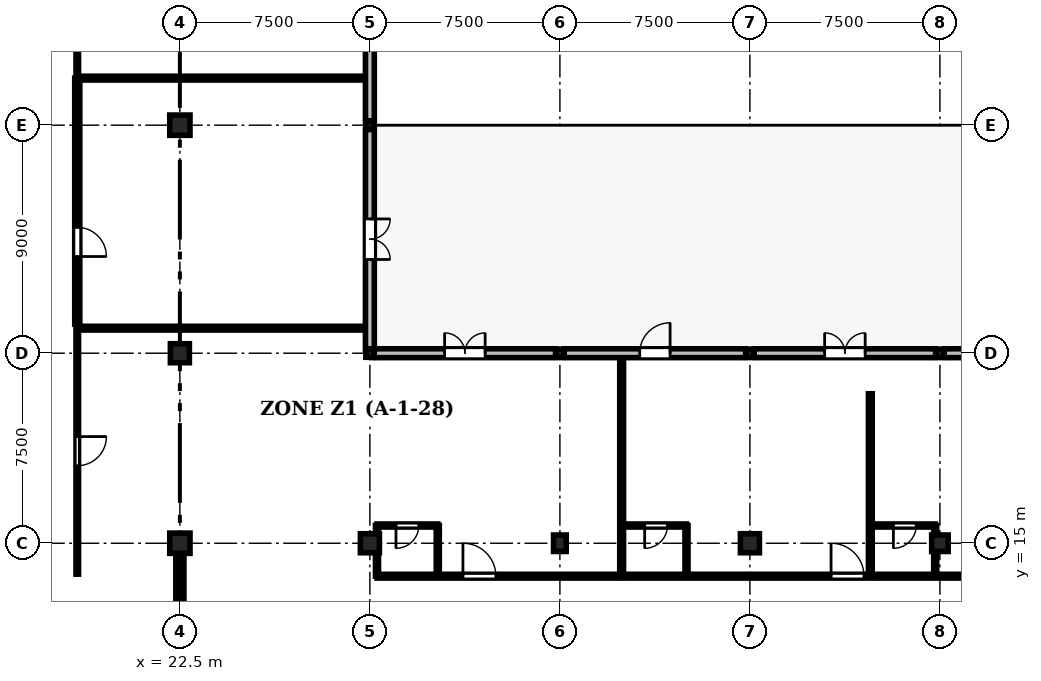
"""IFC4 building model, lengths in metres.
Left out: names, types, materials, properties, quantities, classifications, styles, units other than length and angle.
Written with IfcOpenShell. Run it as: python <this file> out.ifc"""

import sys

from ifc_helpers import new_model, si_unit, direction, frame, frame_2d, origin, origin_2d, place, context, subcontext, project, spatial, rectangle, circle, extrude, element, fill, save


model = new_model("IFC4")
c1 = context("Model", 3, precision=1e-05, world=origin(), true_north=direction((0.0, 1.0)))
c2 = subcontext(c1, "Body", "Model", "MODEL_VIEW")
j1 = project(units=[si_unit("LENGTHUNIT", "METRE"), si_unit("PLANEANGLEUNIT", "RADIAN")], contexts=[c1])
p1 = place(None, origin())
s1 = spatial("IfcSite", under=j1, at=p1, CompositionType="ELEMENT")
p2 = place(p1, origin())
s2 = spatial("IfcBuilding", under=s1, at=p2, CompositionType="ELEMENT")
p3 = place(p2, frame((0.0, 0.0, 9.3)))
s3 = spatial("IfcBuildingStorey", under=s2, at=p3, CompositionType="ELEMENT", Elevation=9.3)
p4 = place(p3, frame((22.5, 15.0, 0.0), z_axis=(0.0, 0.0, 1.0), x_axis=(1.0, 0.0, 0.0)))
e1 = element("IfcColumn", 1, at=p4, inside=s3, PredefinedType="COLUMN", context=c2, shape_type="SweptSolid", body=[
    extrude(rectangle(XDim=0.8, YDim=0.8, at=origin_2d()), origin(), (0.0, 0.0, 1.0), 4.8),
])
p5 = place(p3, frame((22.5, 22.5, 0.0), z_axis=(0.0, 0.0, 1.0), x_axis=(1.0, 0.0, 0.0)))
e2 = element("IfcColumn", 2, at=p5, inside=s3, PredefinedType="COLUMN", context=c2, shape_type="SweptSolid", body=[
    extrude(circle(Radius=0.375, at=origin_2d()), origin(), (0.0, 0.0, 1.0), 4.8),
])
p6 = place(p3, frame((22.5, 31.5, 0.0), z_axis=(0.0, 0.0, 1.0), x_axis=(1.0, 0.0, 0.0)))
e3 = element("IfcColumn", 3, at=p6, inside=s3, PredefinedType="COLUMN", context=c2, shape_type="SweptSolid", body=[
    extrude(rectangle(XDim=0.8, YDim=0.8, at=origin_2d()), origin(), (0.0, 0.0, 1.0), 4.8),
])
p7 = place(p3, frame((30.0, 15.0, 0.0), z_axis=(0.0, 0.0, 1.0), x_axis=(1.0, 0.0, 0.0)))
e4 = element("IfcColumn", 4, at=p7, inside=s3, PredefinedType="COLUMN", context=c2, shape_type="SweptSolid", body=[
    extrude(circle(Radius=0.375, at=origin_2d()), origin(), (0.0, 0.0, 1.0), 4.8),
])
for number, where, z_axis, x_axis in (
    (5, (30.0, 22.5, 0.0), (0.0, 0.0, 1.0), (1.0, 0.0, 0.0)),
    (6, (30.0, 31.5, 0.0), (0.0, 0.0, 1.0), (1.0, 0.0, 0.0)),
):
    element("IfcColumn", number, at=place(p3, frame(where, z_axis=z_axis, x_axis=x_axis)), inside=s3, PredefinedType="COLUMN", context=c2, shape_type="SweptSolid", body=[
        extrude(rectangle(XDim=0.32, YDim=0.32, at=origin_2d()), origin(), (0.0, 0.0, 1.0), 4.8),
    ])
p8 = place(p3, frame((37.5, 15.0, 0.0), z_axis=(0.0, 0.0, 1.0), x_axis=(1.0, 0.0, 0.0)))
e7 = element("IfcColumn", 7, at=p8, inside=s3, PredefinedType="COLUMN", context=c2, shape_type="SweptSolid", body=[
    extrude(rectangle(XDim=0.5, YDim=0.65, at=origin_2d()), origin(), (0.0, 0.0, 1.0), 4.8),
])
p9 = place(p3, frame((37.5, 22.5, 0.0), z_axis=(0.0, 0.0, 1.0), x_axis=(1.0, 0.0, 0.0)))
e8 = element("IfcColumn", 8, at=p9, inside=s3, PredefinedType="COLUMN", context=c2, shape_type="SweptSolid", body=[
    extrude(rectangle(XDim=0.32, YDim=0.32, at=origin_2d()), origin(), (0.0, 0.0, 1.0), 4.8),
])
p10 = place(p3, frame((45.0, 15.0, 0.0), z_axis=(0.0, 0.0, 1.0), x_axis=(1.0, 0.0, 0.0)))
e9 = element("IfcColumn", 9, at=p10, inside=s3, PredefinedType="COLUMN", context=c2, shape_type="SweptSolid", body=[
    extrude(rectangle(XDim=0.75, YDim=0.75, at=origin_2d()), origin(), (0.0, 0.0, 1.0), 4.8),
])
p11 = place(p3, frame((45.0, 22.5, 0.0), z_axis=(0.0, 0.0, 1.0), x_axis=(1.0, 0.0, 0.0)))
e10 = element("IfcColumn", 10, at=p11, inside=s3, PredefinedType="COLUMN", context=c2, shape_type="SweptSolid", body=[
    extrude(rectangle(XDim=0.32, YDim=0.32, at=origin_2d()), origin(), (0.0, 0.0, 1.0), 4.8),
])
p12 = place(p3, frame((52.5, 15.0, 0.0), z_axis=(0.0, 0.0, 1.0), x_axis=(1.0, 0.0, 0.0)))
e11 = element("IfcColumn", 11, at=p12, inside=s3, PredefinedType="COLUMN", context=c2, shape_type="SweptSolid", body=[
    extrude(rectangle(XDim=0.65, YDim=0.65, at=origin_2d()), origin(), (0.0, 0.0, 1.0), 4.8),
])
p13 = place(p3, frame((52.5, 22.5, 0.0), z_axis=(0.0, 0.0, 1.0), x_axis=(1.0, 0.0, 0.0)))
e12 = element("IfcColumn", 12, at=p13, inside=s3, PredefinedType="COLUMN", context=c2, shape_type="SweptSolid", body=[
    extrude(rectangle(XDim=0.32, YDim=0.32, at=origin_2d()), origin(), (0.0, 0.0, 1.0), 4.8),
])
p14 = place(p3, frame((22.5, 7.95, 0.0), z_axis=(0.0, 0.0, 1.0), x_axis=(0.0, 1.0, 0.0)))
e13 = element("IfcWall", 13, at=p14, inside=s3, PredefinedType="SHEAR", context=c2, shape_type="SweptSolid", body=[
    extrude(rectangle(XDim=6.6, YDim=0.32, at=frame_2d((3.3, 0.0))), origin(), (0.0, 0.0, 1.0), 4.0),
])
p15 = place(p3, frame((30.0, 31.33, 0.0), z_axis=(0.0, 0.0, 1.0), x_axis=(0.0, -1.0, 0.0)))
e14 = element("IfcWall", 14, at=p15, inside=s3, PredefinedType="STANDARD", context=c2, shape_type="SweptSolid", body=[
    extrude(rectangle(XDim=8.66, YDim=0.35, at=frame_2d((4.33, 0.0))), origin(), (0.0, 0.0, 1.0), 4.0),
])
p16 = place(p15, frame((3.53, 0.0, 0.0)))
e15 = element("IfcOpeningElement", 15, at=p16, cuts=e14, PredefinedType="OPENING", context=c2, shape_type="SweptSolid", body=[
    extrude(rectangle(XDim=1.6, YDim=2.35, at=frame_2d((0.8, 1.175))), frame((0.0, 0.185, 0.0), z_axis=(0.0, -1.0, 0.0), x_axis=(1.0, 0.0, 0.0)), (0.0, 0.0, 1.0), 0.37),
])
p17 = place(p3, frame((30.0, 38.83, 0.0), z_axis=(0.0, 0.0, 1.0), x_axis=(0.0, -1.0, 0.0)))
e16 = element("IfcWall", 16, at=p17, inside=s3, PredefinedType="STANDARD", context=c2, shape_type="SweptSolid", body=[
    extrude(rectangle(XDim=7.16, YDim=0.35, at=frame_2d((3.58, 0.0))), origin(), (0.0, 0.0, 1.0), 3.95),
])
p18 = place(p17, frame((2.78, 0.0, 0.9)))
e17 = element("IfcOpeningElement", 17, at=p18, cuts=e16, PredefinedType="OPENING", context=c2, shape_type="SweptSolid", body=[
    extrude(rectangle(XDim=1.6, YDim=1.8, at=frame_2d((0.8, 0.9))), frame((0.0, 0.185, 0.0), z_axis=(0.0, -1.0, 0.0), x_axis=(1.0, 0.0, 0.0)), (0.0, 0.0, 1.0), 0.37),
])
p19 = place(p3, frame((30.17, 22.5, 0.0), z_axis=(0.0, 0.0, 1.0), x_axis=(1.0, 0.0, 0.0)))
e18 = element("IfcWall", 18, at=p19, inside=s3, PredefinedType="STANDARD", context=c2, shape_type="SweptSolid", body=[
    extrude(rectangle(XDim=7.16, YDim=0.35, at=frame_2d((3.58, 0.0))), origin(), (0.0, 0.0, 1.0), 3.95),
])
p20 = place(p19, frame((2.78, 0.0, 0.0)))
e19 = element("IfcOpeningElement", 19, at=p20, cuts=e18, PredefinedType="OPENING", context=c2, shape_type="SweptSolid", body=[
    extrude(rectangle(XDim=1.6, YDim=2.35, at=frame_2d((0.8, 1.175))), frame((0.0, 0.185, 0.0), z_axis=(0.0, -1.0, 0.0), x_axis=(1.0, 0.0, 0.0)), (0.0, 0.0, 1.0), 0.37),
])
p21 = place(p3, frame((37.67, 22.5, 0.0), z_axis=(0.0, 0.0, 1.0), x_axis=(1.0, 0.0, 0.0)))
e20 = element("IfcWall", 20, at=p21, inside=s3, PredefinedType="STANDARD", context=c2, shape_type="SweptSolid", body=[
    extrude(rectangle(XDim=7.16, YDim=0.35, at=frame_2d((3.58, 0.0))), origin(), (0.0, 0.0, 1.0), 3.95),
])
p22 = place(p21, frame((2.98, 0.0, 0.0)))
e21 = element("IfcOpeningElement", 21, at=p22, cuts=e20, PredefinedType="OPENING", context=c2, shape_type="SweptSolid", body=[
    extrude(rectangle(XDim=1.2, YDim=2.3, at=frame_2d((0.6, 1.15))), frame((0.0, 0.185, 0.0), z_axis=(0.0, -1.0, 0.0), x_axis=(1.0, 0.0, 0.0)), (0.0, 0.0, 1.0), 0.37),
])
p23 = place(p3, frame((45.17, 22.5, 0.0), z_axis=(0.0, 0.0, 1.0), x_axis=(1.0, 0.0, 0.0)))
e22 = element("IfcWall", 22, at=p23, inside=s3, PredefinedType="STANDARD", context=c2, shape_type="SweptSolid", body=[
    extrude(rectangle(XDim=7.16, YDim=0.35, at=frame_2d((3.58, 0.0))), origin(), (0.0, 0.0, 1.0), 3.95),
])
p24 = place(p23, frame((2.78, 0.0, 0.0)))
e23 = element("IfcOpeningElement", 23, at=p24, cuts=e22, PredefinedType="OPENING", context=c2, shape_type="SweptSolid", body=[
    extrude(rectangle(XDim=1.6, YDim=2.35, at=frame_2d((0.8, 1.175))), frame((0.0, 0.185, 0.0), z_axis=(0.0, -1.0, 0.0), x_axis=(1.0, 0.0, 0.0)), (0.0, 0.0, 1.0), 0.37),
])
p25 = place(p3, frame((52.67, 22.5, 0.0), z_axis=(0.0, 0.0, 1.0), x_axis=(1.0, 0.0, 0.0)))
e24 = element("IfcWall", 24, at=p25, inside=s3, PredefinedType="STANDARD", context=c2, shape_type="SweptSolid", body=[
    extrude(rectangle(XDim=7.02, YDim=0.35, at=frame_2d((3.51, 0.0))), origin(), (0.0, 0.0, 1.0), 3.95),
])
p26 = place(p25, frame((2.91, 0.0, 0.0)))
e25 = element("IfcOpeningElement", 25, at=p26, cuts=e24, PredefinedType="OPENING", context=c2, shape_type="SweptSolid", body=[
    extrude(rectangle(XDim=1.2, YDim=2.3, at=frame_2d((0.6, 1.15))), frame((0.0, 0.185, 0.0), z_axis=(0.0, -1.0, 0.0), x_axis=(1.0, 0.0, 0.0)), (0.0, 0.0, 1.0), 0.37),
])
p27 = place(p3, frame((18.45, 23.489, 0.0), z_axis=(0.0, 0.0, 1.0), x_axis=(0.0, -1.0, 0.0)))
e26 = element("IfcWall", 26, at=p27, inside=s3, PredefinedType="PARTITIONING", context=c2, shape_type="SweptSolid", body=[
    extrude(rectangle(XDim=9.709, YDim=0.1, at=frame_2d((4.854, 0.0))), origin(), (0.0, 0.0, 1.0), 4.135),
])
p28 = place(p27, frame((4.279, 0.0, 0.0)))
e27 = element("IfcOpeningElement", 27, at=p28, cuts=e26, PredefinedType="OPENING", context=c2, shape_type="SweptSolid", body=[
    extrude(rectangle(XDim=1.15, YDim=2.2, at=frame_2d((0.575, 1.1))), frame((0.0, 0.06, 0.0), z_axis=(0.0, -1.0, 0.0), x_axis=(1.0, 0.0, 0.0)), (0.0, 0.0, 1.0), 0.12),
])
p29 = place(p3, frame((18.45, 33.357, 0.0), z_axis=(0.0, 0.0, 1.0), x_axis=(0.0, -1.0, 0.0)))
e28 = element("IfcWall", 28, at=p29, inside=s3, PredefinedType="STANDARD", context=c2, shape_type="SweptSolid", body=[
    extrude(rectangle(XDim=9.709, YDim=0.2, at=frame_2d((4.854, 0.0))), origin(), (0.0, 0.0, 1.0), 4.135),
])
p30 = place(p29, frame((5.891, 0.0, 0.0)))
e29 = element("IfcOpeningElement", 29, at=p30, cuts=e28, PredefinedType="OPENING", context=c2, shape_type="SweptSolid", body=[
    extrude(rectangle(XDim=1.15, YDim=2.2, at=frame_2d((0.575, 1.1))), frame((0.0, 0.11, 0.0), z_axis=(0.0, -1.0, 0.0), x_axis=(1.0, 0.0, 0.0)), (0.0, 0.0, 1.0), 0.22),
])
p31 = place(p3, frame((18.45, 43.226, 0.0), z_axis=(0.0, 0.0, 1.0), x_axis=(0.0, -1.0, 0.0)))
e30 = element("IfcWall", 30, at=p31, inside=s3, PredefinedType="PARTITIONING", context=c2, shape_type="SweptSolid", body=[
    extrude(rectangle(XDim=9.709, YDim=0.1, at=frame_2d((4.854, 0.0))), origin(), (0.0, 0.0, 1.0), 4.535),
])
p32 = place(p31, frame((7.593, 0.0, 0.0)))
e31 = element("IfcOpeningElement", 31, at=p32, cuts=e30, PredefinedType="OPENING", context=c2, shape_type="SweptSolid", body=[
    extrude(rectangle(XDim=1.05, YDim=2.2, at=frame_2d((0.525, 1.1))), frame((0.0, 0.06, 0.0), z_axis=(0.0, -1.0, 0.0), x_axis=(1.0, 0.0, 0.0)), (0.0, 0.0, 1.0), 0.12),
])
p33 = place(p3, frame((30.28, 13.7, 0.0), z_axis=(0.0, 0.0, 1.0), x_axis=(1.0, 0.0, 0.0)))
e32 = element("IfcWall", 32, at=p33, inside=s3, PredefinedType="PARTITIONING", context=c2, shape_type="SweptSolid", body=[
    extrude(rectangle(XDim=9.657, YDim=0.15, at=frame_2d((4.828, 0.0))), origin(), (0.0, 0.0, 1.0), 4.535),
])
p34 = place(p33, frame((3.393, 0.0, 0.0)))
e33 = element("IfcOpeningElement", 33, at=p34, cuts=e32, PredefinedType="OPENING", context=c2, shape_type="SweptSolid", body=[
    extrude(rectangle(XDim=1.3, YDim=2.2, at=frame_2d((0.65, 1.1))), frame((0.0, 0.085, 0.0), z_axis=(0.0, -1.0, 0.0), x_axis=(1.0, 0.0, 0.0)), (0.0, 0.0, 1.0), 0.17),
])
p35 = place(p3, frame((32.68, 15.7, 0.0), z_axis=(0.0, 0.0, 1.0), x_axis=(-1.0, 0.0, 0.0)))
e34 = element("IfcWall", 34, at=p35, inside=s3, PredefinedType="PARTITIONING", context=c2, shape_type="SweptSolid", body=[
    extrude(rectangle(XDim=2.4, YDim=0.12, at=frame_2d((1.2, 0.0))), origin(), (0.0, 0.0, 1.0), 4.535),
])
p36 = place(p35, frame((0.75, 0.0, 0.0)))
e35 = element("IfcOpeningElement", 35, at=p36, cuts=e34, PredefinedType="OPENING", context=c2, shape_type="SweptSolid", body=[
    extrude(rectangle(XDim=0.9, YDim=2.1, at=frame_2d((0.45, 1.05))), frame((0.0, 0.07, 0.0), z_axis=(0.0, -1.0, 0.0), x_axis=(1.0, 0.0, 0.0)), (0.0, 0.0, 1.0), 0.14),
])
p37 = place(p3, frame((32.68, 13.7, 0.0), z_axis=(0.0, 0.0, 1.0), x_axis=(0.0, 1.0, 0.0)))
e36 = element("IfcWall", 36, at=p37, inside=s3, PredefinedType="PARTITIONING", context=c2, shape_type="SweptSolid", body=[
    extrude(rectangle(XDim=2.0, YDim=0.12, at=frame_2d((1.0, 0.0))), origin(), (0.0, 0.0, 1.0), 4.535),
])
p38 = place(p3, frame((40.097, 13.7, 0.0), z_axis=(0.0, 0.0, 1.0), x_axis=(1.0, 0.0, 0.0)))
e37 = element("IfcWall", 37, at=p38, inside=s3, PredefinedType="PARTITIONING", context=c2, shape_type="SweptSolid", body=[
    extrude(rectangle(XDim=9.657, YDim=0.15, at=frame_2d((4.828, 0.0))), origin(), (0.0, 0.0, 1.0), 4.535),
])
p39 = place(p38, frame((8.107, 0.0, 0.0)))
e38 = element("IfcOpeningElement", 38, at=p39, cuts=e37, PredefinedType="OPENING", context=c2, shape_type="SweptSolid", body=[
    extrude(rectangle(XDim=1.3, YDim=2.2, at=frame_2d((0.65, 1.1))), frame((0.0, 0.085, 0.0), z_axis=(0.0, -1.0, 0.0), x_axis=(1.0, 0.0, 0.0)), (0.0, 0.0, 1.0), 0.17),
])
p40 = place(p3, frame((42.497, 15.7, 0.0), z_axis=(0.0, 0.0, 1.0), x_axis=(-1.0, 0.0, 0.0)))
e39 = element("IfcWall", 39, at=p40, inside=s3, PredefinedType="PARTITIONING", context=c2, shape_type="SweptSolid", body=[
    extrude(rectangle(XDim=2.4, YDim=0.12, at=frame_2d((1.2, 0.0))), origin(), (0.0, 0.0, 1.0), 4.535),
])
p41 = place(p40, frame((0.75, 0.0, 0.0)))
e40 = element("IfcOpeningElement", 40, at=p41, cuts=e39, PredefinedType="OPENING", context=c2, shape_type="SweptSolid", body=[
    extrude(rectangle(XDim=0.9, YDim=2.1, at=frame_2d((0.45, 1.05))), frame((0.0, 0.07, 0.0), z_axis=(0.0, -1.0, 0.0), x_axis=(1.0, 0.0, 0.0)), (0.0, 0.0, 1.0), 0.14),
])
p42 = place(p3, frame((42.497, 13.7, 0.0), z_axis=(0.0, 0.0, 1.0), x_axis=(0.0, 1.0, 0.0)))
e41 = element("IfcWall", 41, at=p42, inside=s3, PredefinedType="PARTITIONING", context=c2, shape_type="SweptSolid", body=[
    extrude(rectangle(XDim=2.0, YDim=0.12, at=frame_2d((1.0, 0.0))), origin(), (0.0, 0.0, 1.0), 4.535),
])
p43 = place(p3, frame((49.913, 13.7, 0.0), z_axis=(0.0, 0.0, 1.0), x_axis=(1.0, 0.0, 0.0)))
e42 = element("IfcWall", 42, at=p43, inside=s3, PredefinedType="PARTITIONING", context=c2, shape_type="SweptSolid", body=[
    extrude(rectangle(XDim=9.657, YDim=0.15, at=frame_2d((4.828, 0.0))), origin(), (0.0, 0.0, 1.0), 4.535),
])
p44 = place(p43, frame((5.75, 0.0, 0.0)))
e43 = element("IfcOpeningElement", 43, at=p44, cuts=e42, PredefinedType="OPENING", context=c2, shape_type="SweptSolid", body=[
    extrude(rectangle(XDim=1.3, YDim=2.2, at=frame_2d((0.65, 1.1))), frame((0.0, 0.085, 0.0), z_axis=(0.0, -1.0, 0.0), x_axis=(1.0, 0.0, 0.0)), (0.0, 0.0, 1.0), 0.17),
])
p45 = place(p3, frame((52.313, 15.7, 0.0), z_axis=(0.0, 0.0, 1.0), x_axis=(-1.0, 0.0, 0.0)))
e44 = element("IfcWall", 44, at=p45, inside=s3, PredefinedType="PARTITIONING", context=c2, shape_type="SweptSolid", body=[
    extrude(rectangle(XDim=2.4, YDim=0.12, at=frame_2d((1.2, 0.0))), origin(), (0.0, 0.0, 1.0), 4.535),
])
p46 = place(p45, frame((0.75, 0.0, 0.0)))
e45 = element("IfcOpeningElement", 45, at=p46, cuts=e44, PredefinedType="OPENING", context=c2, shape_type="SweptSolid", body=[
    extrude(rectangle(XDim=0.9, YDim=2.1, at=frame_2d((0.45, 1.05))), frame((0.0, 0.07, 0.0), z_axis=(0.0, -1.0, 0.0), x_axis=(1.0, 0.0, 0.0)), (0.0, 0.0, 1.0), 0.14),
])
p47 = place(p3, frame((52.313, 13.7, 0.0), z_axis=(0.0, 0.0, 1.0), x_axis=(0.0, 1.0, 0.0)))
e46 = element("IfcWall", 46, at=p47, inside=s3, PredefinedType="PARTITIONING", context=c2, shape_type="SweptSolid", body=[
    extrude(rectangle(XDim=2.0, YDim=0.12, at=frame_2d((1.0, 0.0))), origin(), (0.0, 0.0, 1.0), 3.985),
])
for number, where, z_axis, x_axis in (
    (47, (18.45, 23.489, 0.0), (0.0, 0.0, 1.0), (1.0, 0.0, 0.0)),
    (48, (18.45, 33.357, 0.0), (0.0, 0.0, 1.0), (1.0, 0.0, 0.0)),
):
    element("IfcWall", number, at=place(p3, frame(where, z_axis=z_axis, x_axis=x_axis)), inside=s3, PredefinedType="PARTITIONING", context=c2, shape_type="SweptSolid", body=[
        extrude(rectangle(XDim=11.2, YDim=0.15, at=frame_2d((5.6, 0.0))), origin(), (0.0, 0.0, 1.0), 4.535),
    ])
p48 = place(p3, frame((39.937, 13.7, 0.0), z_axis=(0.0, 0.0, 1.0), x_axis=(0.0, 1.0, 0.0)))
e49 = element("IfcWall", 49, at=p48, inside=s3, PredefinedType="PARTITIONING", context=c2, shape_type="SweptSolid", body=[
    extrude(rectangle(XDim=8.45, YDim=0.15, at=frame_2d((4.225, 0.0))), origin(), (0.0, 0.0, 1.0), 4.535),
])
p49 = place(p3, frame((49.753, 13.7, 0.0), z_axis=(0.0, 0.0, 1.0), x_axis=(0.0, 1.0, 0.0)))
e50 = element("IfcWall", 50, at=p49, inside=s3, PredefinedType="PARTITIONING", context=c2, shape_type="SweptSolid", body=[
    extrude(rectangle(XDim=7.2, YDim=0.15, at=frame_2d((3.6, 0.0))), origin(), (0.0, 0.0, 1.0), 4.535),
])
p50 = place(p3, frame((30.28, 13.7, 0.0), z_axis=(0.0, 0.0, 1.0), x_axis=(0.0, 1.0, 0.0)))
e51 = element("IfcWall", 51, at=p50, inside=s3, PredefinedType="PARTITIONING", context=c2, shape_type="SweptSolid", body=[
    extrude(rectangle(XDim=2.0, YDim=0.12, at=frame_2d((1.0, 0.0))), origin(), (0.0, 0.0, 1.0), 3.985),
])
p51 = place(p16, origin())
e52 = element("IfcDoor", 52, at=p51, inside=s3, OperationType="DOUBLE_DOOR_SINGLE_SWING", PredefinedType="DOOR", context=c2, shape_type="SweptSolid", body=[
    extrude(rectangle(XDim=1.6, YDim=2.35, at=frame_2d((0.8, 1.175))), frame((0.0, 0.025, 0.0), z_axis=(0.0, -1.0, 0.0), x_axis=(1.0, 0.0, 0.0)), (0.0, 0.0, 1.0), 0.05),
])
fill(e15, e52)
p52 = place(p20, origin())
e53 = element("IfcDoor", 53, at=p52, inside=s3, OperationType="DOUBLE_DOOR_SINGLE_SWING", PredefinedType="DOOR", context=c2, shape_type="SweptSolid", body=[
    extrude(rectangle(XDim=1.6, YDim=2.35, at=frame_2d((0.8, 1.175))), frame((0.0, 0.025, 0.0), z_axis=(0.0, -1.0, 0.0), x_axis=(1.0, 0.0, 0.0)), (0.0, 0.0, 1.0), 0.05),
])
fill(e19, e53)
p53 = place(p22, origin())
e54 = element("IfcDoor", 54, at=p53, inside=s3, OperationType="SINGLE_SWING_RIGHT", PredefinedType="DOOR", context=c2, shape_type="SweptSolid", body=[
    extrude(rectangle(XDim=1.2, YDim=2.3, at=frame_2d((0.6, 1.15))), frame((0.0, 0.025, 0.0), z_axis=(0.0, -1.0, 0.0), x_axis=(1.0, 0.0, 0.0)), (0.0, 0.0, 1.0), 0.05),
])
fill(e21, e54)
p54 = place(p24, origin())
e55 = element("IfcDoor", 55, at=p54, inside=s3, OperationType="DOUBLE_DOOR_SINGLE_SWING", PredefinedType="DOOR", context=c2, shape_type="SweptSolid", body=[
    extrude(rectangle(XDim=1.6, YDim=2.35, at=frame_2d((0.8, 1.175))), frame((0.0, 0.025, 0.0), z_axis=(0.0, -1.0, 0.0), x_axis=(1.0, 0.0, 0.0)), (0.0, 0.0, 1.0), 0.05),
])
fill(e23, e55)
p55 = place(p28, origin())
e56 = element("IfcDoor", 56, at=p55, inside=s3, OperationType="SINGLE_SWING_LEFT", PredefinedType="DOOR", context=c2, shape_type="SweptSolid", body=[
    extrude(rectangle(XDim=1.15, YDim=2.2, at=frame_2d((0.575, 1.1))), frame((0.0, 0.025, 0.0), z_axis=(0.0, -1.0, 0.0), x_axis=(1.0, 0.0, 0.0)), (0.0, 0.0, 1.0), 0.05),
])
fill(e27, e56)
p56 = place(p30, origin())
e57 = element("IfcDoor", 57, at=p56, inside=s3, OperationType="SINGLE_SWING_RIGHT", PredefinedType="DOOR", context=c2, shape_type="SweptSolid", body=[
    extrude(rectangle(XDim=1.15, YDim=2.2, at=frame_2d((0.575, 1.1))), frame((0.0, 0.025, 0.0), z_axis=(0.0, -1.0, 0.0), x_axis=(1.0, 0.0, 0.0)), (0.0, 0.0, 1.0), 0.05),
])
fill(e29, e57)
p57 = place(p34, origin())
e58 = element("IfcDoor", 58, at=p57, inside=s3, OperationType="SINGLE_SWING_LEFT", PredefinedType="DOOR", context=c2, shape_type="SweptSolid", body=[
    extrude(rectangle(XDim=1.3, YDim=2.2, at=frame_2d((0.65, 1.1))), frame((0.0, 0.025, 0.0), z_axis=(0.0, -1.0, 0.0), x_axis=(1.0, 0.0, 0.0)), (0.0, 0.0, 1.0), 0.05),
])
fill(e33, e58)
p58 = place(p36, origin())
e59 = element("IfcDoor", 59, at=p58, inside=s3, OperationType="SINGLE_SWING_RIGHT", PredefinedType="DOOR", context=c2, shape_type="SweptSolid", body=[
    extrude(rectangle(XDim=0.9, YDim=2.1, at=frame_2d((0.45, 1.05))), frame((0.0, 0.025, 0.0), z_axis=(0.0, -1.0, 0.0), x_axis=(1.0, 0.0, 0.0)), (0.0, 0.0, 1.0), 0.05),
])
fill(e35, e59)
p59 = place(p39, origin())
e60 = element("IfcDoor", 60, at=p59, inside=s3, OperationType="SINGLE_SWING_LEFT", PredefinedType="DOOR", context=c2, shape_type="SweptSolid", body=[
    extrude(rectangle(XDim=1.3, YDim=2.2, at=frame_2d((0.65, 1.1))), frame((0.0, 0.025, 0.0), z_axis=(0.0, -1.0, 0.0), x_axis=(1.0, 0.0, 0.0)), (0.0, 0.0, 1.0), 0.05),
])
fill(e38, e60)
p60 = place(p41, origin())
e61 = element("IfcDoor", 61, at=p60, inside=s3, OperationType="SINGLE_SWING_RIGHT", PredefinedType="DOOR", context=c2, shape_type="SweptSolid", body=[
    extrude(rectangle(XDim=0.9, YDim=2.1, at=frame_2d((0.45, 1.05))), frame((0.0, 0.025, 0.0), z_axis=(0.0, -1.0, 0.0), x_axis=(1.0, 0.0, 0.0)), (0.0, 0.0, 1.0), 0.05),
])
fill(e40, e61)
p61 = place(p46, origin())
e62 = element("IfcDoor", 62, at=p61, inside=s3, OperationType="SINGLE_SWING_RIGHT", PredefinedType="DOOR", context=c2, shape_type="SweptSolid", body=[
    extrude(rectangle(XDim=0.9, YDim=2.1, at=frame_2d((0.45, 1.05))), frame((0.0, 0.025, 0.0), z_axis=(0.0, -1.0, 0.0), x_axis=(1.0, 0.0, 0.0)), (0.0, 0.0, 1.0), 0.05),
])
fill(e45, e62)
save(model, sys.argv[1])
